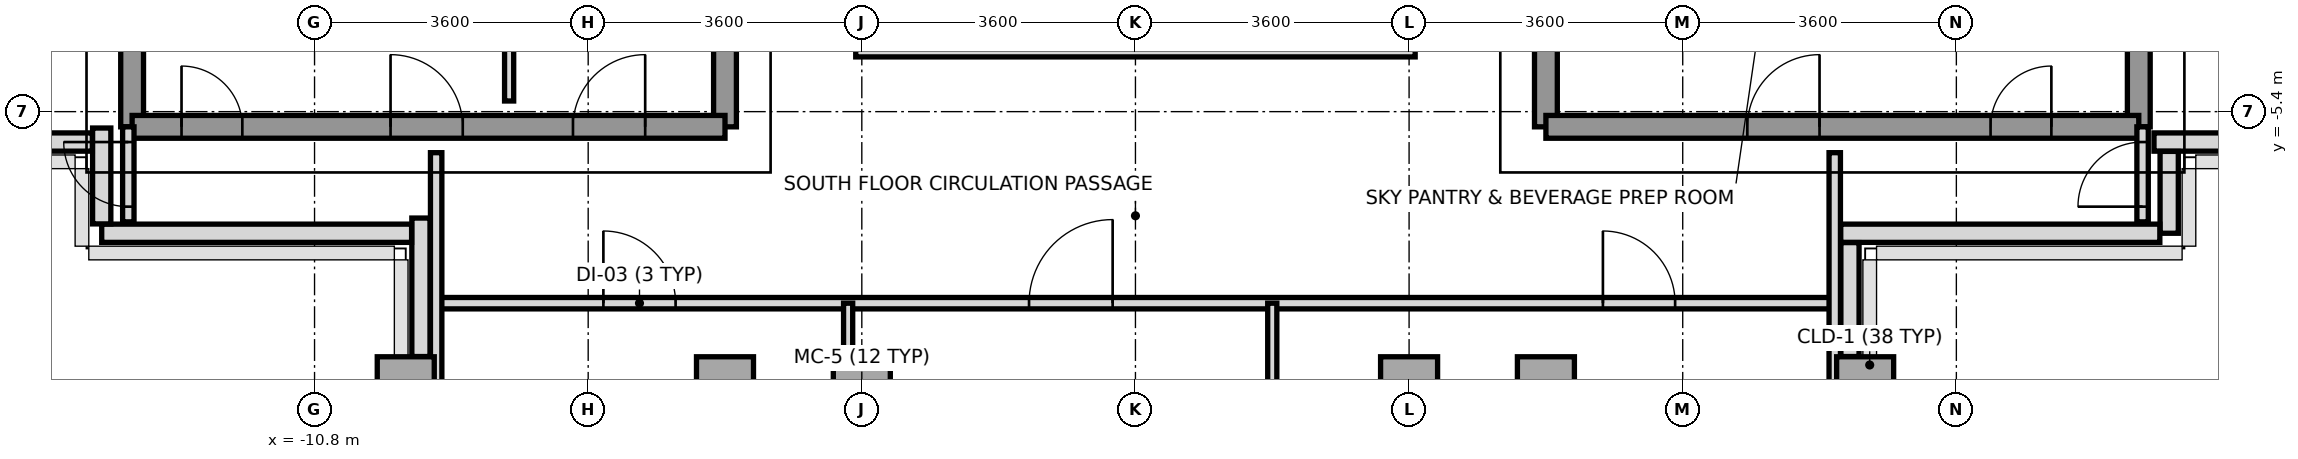
"""IFC4 building model, lengths in metres.
Left out: names, types, materials, properties, quantities, classifications, styles, units other than length and angle.
Written with IfcOpenShell. Run it as: python <this file> out.ifc"""

import sys

from ifc_helpers import new_model, si_unit, direction, frame, frame_2d, origin, origin_2d, place, context, subcontext, project, spatial, rectangle, extrude, source, transform, mapped, element, fill, save


model = new_model("IFC4")
c1 = context("Model", 3, precision=1e-05, world=origin(), true_north=direction((0.0, 1.0)))
c2 = subcontext(c1, "Body", "Model", "MODEL_VIEW")
j1 = project(units=[si_unit("LENGTHUNIT", "METRE"), si_unit("PLANEANGLEUNIT", "RADIAN")], contexts=[c1])
p1 = place(None, origin())
s1 = spatial("IfcSite", under=j1, at=p1, CompositionType="ELEMENT")
p2 = place(p1, origin())
s2 = spatial("IfcBuilding", under=s1, at=p2, CompositionType="ELEMENT")
p3 = place(p2, frame((0.0, 0.0, 252.4)))
s3 = spatial("IfcBuildingStorey", under=s2, at=p3, CompositionType="ELEMENT", Elevation=252.4)
m1 = source(origin(), c2, "Body", "SweptSolid", [
    extrude(rectangle(XDim=0.75, YDim=0.75, at=origin_2d()), origin(), (0.0, 0.0, 1.0), 3.01),
])
for number, where, z_axis, x_axis in (
    (1, (-9.6, -9.0, 0.0), (0.0, 0.0, 1.0), (1.0, 0.0, 0.0)),
    (2, (-5.4, -9.0, 0.0), (0.0, 0.0, 1.0), (1.0, 0.0, 0.0)),
    (3, (-3.6, -9.0, 0.0), (0.0, 0.0, 1.0), (1.0, 0.0, 0.0)),
    (4, (3.6, -9.0, 0.0), (0.0, 0.0, 1.0), (1.0, 0.0, 0.0)),
    (5, (5.4, -9.0, 0.0), (0.0, 0.0, 1.0), (1.0, 0.0, 0.0)),
    (6, (9.6, -9.0, 0.0), (0.0, 0.0, 1.0), (1.0, 0.0, 0.0)),
):
    element("IfcColumn", number, at=place(p3, frame(where, z_axis=z_axis, x_axis=x_axis)), inside=s3, PredefinedType="COLUMN", context=c2, shape_type="MappedRepresentation", body=[
        mapped(m1, transform((0.0, 0.0, 0.0), x_axis=(1.0, 0.0, 0.0), y_axis=(0.0, 1.0, 0.0), z_axis=(0.0, 0.0, 1.0), scale=1.0)),
    ])
p4 = place(p3, frame((14.677, -5.8, 0.0), z_axis=(0.0, 0.0, 1.0), x_axis=(-1.0, 0.0, 0.0)))
e7 = element("IfcWall", 7, at=p4, inside=s3, PredefinedType="PARAPET", context=c2, shape_type="SweptSolid", body=[
    extrude(rectangle(XDim=1.277, YDim=0.24, at=frame_2d((0.639, 0.0))), origin(), (0.0, 0.0, 1.0), 1.15),
])
p5 = place(p3, frame((13.6, -5.923, 0.0), z_axis=(0.0, 0.0, 1.0), x_axis=(0.0, -1.0, 0.0)))
e8 = element("IfcWall", 8, at=p5, inside=s3, PredefinedType="PARAPET", context=c2, shape_type="SweptSolid", body=[
    extrude(rectangle(XDim=1.077, YDim=0.24, at=frame_2d((0.539, 0.0))), origin(), (0.0, 0.0, 1.0), 1.15),
])
p6 = place(p3, frame((13.477, -7.0, 0.0), z_axis=(0.0, 0.0, 1.0), x_axis=(-1.0, 0.0, 0.0)))
e9 = element("IfcWall", 9, at=p6, inside=s3, PredefinedType="PARAPET", context=c2, shape_type="SweptSolid", body=[
    extrude(rectangle(XDim=4.199, YDim=0.24, at=frame_2d((2.1, 0.0))), origin(), (0.0, 0.0, 1.0), 1.15),
])
p7 = place(p3, frame((9.4, -7.123, 0.0), z_axis=(0.0, 0.0, 1.0), x_axis=(0.0, -1.0, 0.0)))
e10 = element("IfcWall", 10, at=p7, inside=s3, PredefinedType="PARAPET", context=c2, shape_type="SweptSolid", body=[
    extrude(rectangle(XDim=1.499, YDim=0.24, at=frame_2d((0.75, 0.0))), origin(), (0.0, 0.0, 1.0), 1.15),
])
p8 = place(p3, frame((-9.4, -8.622, 0.0), z_axis=(0.0, 0.0, 1.0), x_axis=(0.0, 1.0, 0.0)))
e11 = element("IfcWall", 11, at=p8, inside=s3, PredefinedType="PARAPET", context=c2, shape_type="SweptSolid", body=[
    extrude(rectangle(XDim=1.822, YDim=0.24, at=frame_2d((0.911, 0.0))), origin(), (0.0, 0.0, 1.0), 1.15),
])
p9 = place(p3, frame((-9.523, -7.0, 0.0), z_axis=(0.0, 0.0, 1.0), x_axis=(-1.0, 0.0, 0.0)))
e12 = element("IfcWall", 12, at=p9, inside=s3, PredefinedType="PARAPET", context=c2, shape_type="SweptSolid", body=[
    extrude(rectangle(XDim=4.077, YDim=0.24, at=frame_2d((2.039, 0.0))), origin(), (0.0, 0.0, 1.0), 1.15),
])
p10 = place(p3, frame((-13.6, -6.877, 0.0), z_axis=(0.0, 0.0, 1.0), x_axis=(0.0, 1.0, 0.0)))
e13 = element("IfcWall", 13, at=p10, inside=s3, PredefinedType="PARAPET", context=c2, shape_type="SweptSolid", body=[
    extrude(rectangle(XDim=1.261, YDim=0.24, at=frame_2d((0.631, 0.0))), origin(), (0.0, 0.0, 1.0), 1.15),
])
p11 = place(p3, frame((-13.723, -5.8, 0.0), z_axis=(0.0, 0.0, 1.0), x_axis=(-1.0, 0.0, 0.0)))
e14 = element("IfcWall", 14, at=p11, inside=s3, PredefinedType="PARAPET", context=c2, shape_type="SweptSolid", body=[
    extrude(rectangle(XDim=1.077, YDim=0.24, at=frame_2d((0.539, 0.0))), origin(), (0.0, 0.0, 1.0), 1.15),
])
p12 = place(p3, frame((-13.2, -5.6, 0.0), z_axis=(0.0, 0.0, 1.0), x_axis=(0.0, 1.0, 0.0)))
e15 = element("IfcWall", 15, at=p12, inside=s3, PredefinedType="SHEAR", context=c2, shape_type="SweptSolid", body=[
    extrude(rectangle(XDim=11.2, YDim=0.3, at=frame_2d((5.6, 0.0))), origin(), (0.0, 0.0, 1.0), 3.01),
])
p13 = place(p3, frame((-5.4, -5.6, 0.0), z_axis=(0.0, 0.0, 1.0), x_axis=(0.0, 1.0, 0.0)))
e16 = element("IfcWall", 16, at=p13, inside=s3, PredefinedType="SHEAR", context=c2, shape_type="SweptSolid", body=[
    extrude(rectangle(XDim=12.5, YDim=0.3, at=frame_2d((6.25, 0.0))), origin(), (0.0, 0.0, 1.0), 3.01),
])
p14 = place(p13, frame((4.55, 0.0, 0.0)))
e17 = element("IfcOpeningElement", 17, at=p14, cuts=e16, PredefinedType="OPENING", context=c2, shape_type="SweptSolid", body=[
    extrude(rectangle(XDim=1.2, YDim=2.2, at=frame_2d((0.6, 1.1))), frame((0.0, 0.16, 0.0), z_axis=(0.0, -1.0, 0.0), x_axis=(1.0, 0.0, 0.0)), (0.0, 0.0, 1.0), 0.32),
])
p15 = place(p13, frame((10.45, 0.0, 0.0)))
e18 = element("IfcOpeningElement", 18, at=p15, cuts=e16, PredefinedType="OPENING", context=c2, shape_type="SweptSolid", body=[
    extrude(rectangle(XDim=1.2, YDim=2.2, at=frame_2d((0.6, 1.1))), frame((0.0, 0.16, 0.0), z_axis=(0.0, -1.0, 0.0), x_axis=(1.0, 0.0, 0.0)), (0.0, 0.0, 1.0), 0.32),
])
p16 = place(p13, frame((6.86, 0.0, 0.0)))
e19 = element("IfcOpeningElement", 19, at=p16, cuts=e16, PredefinedType="OPENING", context=c2, shape_type="SweptSolid", body=[
    extrude(rectangle(XDim=0.8, YDim=2.1, at=frame_2d((0.4, 1.05))), frame((0.0, 0.16, 0.0), z_axis=(0.0, -1.0, 0.0), x_axis=(1.0, 0.0, 0.0)), (0.0, 0.0, 1.0), 0.32),
])
p17 = place(p13, frame((7.88, 0.0, 0.0)))
e20 = element("IfcOpeningElement", 20, at=p17, cuts=e16, PredefinedType="OPENING", context=c2, shape_type="SweptSolid", body=[
    extrude(rectangle(XDim=0.8, YDim=2.1, at=frame_2d((0.4, 1.05))), frame((0.0, 0.16, 0.0), z_axis=(0.0, -1.0, 0.0), x_axis=(1.0, 0.0, 0.0)), (0.0, 0.0, 1.0), 0.32),
])
p18 = place(p3, frame((-13.2, -5.6, 0.0), z_axis=(0.0, 0.0, 1.0), x_axis=(1.0, 0.0, 0.0)))
e21 = element("IfcWall", 21, at=p18, inside=s3, PredefinedType="SHEAR", context=c2, shape_type="SweptSolid", body=[
    extrude(rectangle(XDim=7.8, YDim=0.3, at=frame_2d((3.9, 0.0))), origin(), (0.0, 0.0, 1.0), 3.01),
])
p19 = place(p18, frame((0.65, 0.0, 0.0)))
e22 = element("IfcOpeningElement", 22, at=p19, cuts=e21, PredefinedType="OPENING", context=c2, shape_type="SweptSolid", body=[
    extrude(rectangle(XDim=0.8, YDim=2.1, at=frame_2d((0.4, 1.05))), frame((0.0, 0.16, 0.0), z_axis=(0.0, -1.0, 0.0), x_axis=(1.0, 0.0, 0.0)), (0.0, 0.0, 1.0), 0.32),
])
p20 = place(p18, frame((3.4, 0.0, 0.0)))
e23 = element("IfcOpeningElement", 23, at=p20, cuts=e21, PredefinedType="OPENING", context=c2, shape_type="SweptSolid", body=[
    extrude(rectangle(XDim=0.95, YDim=2.15, at=frame_2d((0.475, 1.075))), frame((0.0, 0.16, 0.0), z_axis=(0.0, -1.0, 0.0), x_axis=(1.0, 0.0, 0.0)), (0.0, 0.0, 1.0), 0.32),
])
p21 = place(p18, frame((5.8, 0.0, 0.0)))
e24 = element("IfcOpeningElement", 24, at=p21, cuts=e21, PredefinedType="OPENING", context=c2, shape_type="SweptSolid", body=[
    extrude(rectangle(XDim=0.95, YDim=2.15, at=frame_2d((0.475, 1.075))), frame((0.0, 0.16, 0.0), z_axis=(0.0, -1.0, 0.0), x_axis=(1.0, 0.0, 0.0)), (0.0, 0.0, 1.0), 0.32),
])
p22 = place(p3, frame((13.2, -5.6, 0.0), z_axis=(0.0, 0.0, 1.0), x_axis=(0.0, 1.0, 0.0)))
e25 = element("IfcWall", 25, at=p22, inside=s3, PredefinedType="SHEAR", context=c2, shape_type="SweptSolid", body=[
    extrude(rectangle(XDim=11.2, YDim=0.3, at=frame_2d((5.6, 0.0))), origin(), (0.0, 0.0, 1.0), 3.01),
])
p23 = place(p3, frame((5.4, -5.6, 0.0), z_axis=(0.0, 0.0, 1.0), x_axis=(0.0, 1.0, 0.0)))
e26 = element("IfcWall", 26, at=p23, inside=s3, PredefinedType="SHEAR", context=c2, shape_type="SweptSolid", body=[
    extrude(rectangle(XDim=12.5, YDim=0.3, at=frame_2d((6.25, 0.0))), origin(), (0.0, 0.0, 1.0), 3.01),
])
p24 = place(p23, frame((4.55, 0.0, 0.0)))
e27 = element("IfcOpeningElement", 27, at=p24, cuts=e26, PredefinedType="OPENING", context=c2, shape_type="SweptSolid", body=[
    extrude(rectangle(XDim=1.2, YDim=2.2, at=frame_2d((0.6, 1.1))), frame((0.0, 0.16, 0.0), z_axis=(0.0, -1.0, 0.0), x_axis=(1.0, 0.0, 0.0)), (0.0, 0.0, 1.0), 0.32),
])
p25 = place(p23, frame((10.45, 0.0, 0.0)))
e28 = element("IfcOpeningElement", 28, at=p25, cuts=e26, PredefinedType="OPENING", context=c2, shape_type="SweptSolid", body=[
    extrude(rectangle(XDim=1.2, YDim=2.2, at=frame_2d((0.6, 1.1))), frame((0.0, 0.16, 0.0), z_axis=(0.0, -1.0, 0.0), x_axis=(1.0, 0.0, 0.0)), (0.0, 0.0, 1.0), 0.32),
])
p26 = place(p3, frame((5.4, -5.6, 0.0), z_axis=(0.0, 0.0, 1.0), x_axis=(1.0, 0.0, 0.0)))
e29 = element("IfcWall", 29, at=p26, inside=s3, PredefinedType="SHEAR", context=c2, shape_type="SweptSolid", body=[
    extrude(rectangle(XDim=7.8, YDim=0.3, at=frame_2d((3.9, 0.0))), origin(), (0.0, 0.0, 1.0), 3.01),
])
p27 = place(p26, frame((5.85, 0.0, 0.0)))
e30 = element("IfcOpeningElement", 30, at=p27, cuts=e29, PredefinedType="OPENING", context=c2, shape_type="SweptSolid", body=[
    extrude(rectangle(XDim=0.8, YDim=2.1, at=frame_2d((0.4, 1.05))), frame((0.0, 0.16, 0.0), z_axis=(0.0, -1.0, 0.0), x_axis=(1.0, 0.0, 0.0)), (0.0, 0.0, 1.0), 0.32),
])
p28 = place(p26, frame((2.65, 0.0, 0.0)))
e31 = element("IfcOpeningElement", 31, at=p28, cuts=e29, PredefinedType="OPENING", context=c2, shape_type="SweptSolid", body=[
    extrude(rectangle(XDim=0.95, YDim=2.15, at=frame_2d((0.475, 1.075))), frame((0.0, 0.16, 0.0), z_axis=(0.0, -1.0, 0.0), x_axis=(1.0, 0.0, 0.0)), (0.0, 0.0, 1.0), 0.32),
])
p29 = place(p3, frame((-8.24, -5.26, 0.0), z_axis=(0.0, 0.0, 1.0), x_axis=(0.0, 1.0, 0.0)))
e32 = element("IfcWall", 32, at=p29, inside=s3, PredefinedType="PARTITIONING", context=c2, shape_type="SweptSolid", body=[
    extrude(rectangle(XDim=2.94, YDim=0.12, at=frame_2d((1.47, 0.0))), origin(), (0.0, 0.0, 1.0), 3.01),
])
p30 = place(p3, frame((-9.2, -7.92, 0.0), z_axis=(0.0, 0.0, 1.0), x_axis=(1.0, 0.0, 0.0)))
e33 = element("IfcWall", 33, at=p30, inside=s3, PredefinedType="PARTITIONING", context=c2, shape_type="SweptSolid", body=[
    extrude(rectangle(XDim=18.4, YDim=0.15, at=frame_2d((9.2, 0.0))), origin(), (0.0, 0.0, 1.0), 2.57),
])
p31 = place(p30, frame((2.2, 0.0, 0.0)))
e34 = element("IfcOpeningElement", 34, at=p31, cuts=e33, PredefinedType="OPENING", context=c2, shape_type="SweptSolid", body=[
    extrude(rectangle(XDim=0.95, YDim=2.15, at=frame_2d((0.475, 1.075))), frame((0.0, 0.085, 0.0), z_axis=(0.0, -1.0, 0.0), x_axis=(1.0, 0.0, 0.0)), (0.0, 0.0, 1.0), 0.17),
])
p32 = place(p30, frame((7.8, 0.0, 0.0)))
e35 = element("IfcOpeningElement", 35, at=p32, cuts=e33, PredefinedType="OPENING", context=c2, shape_type="SweptSolid", body=[
    extrude(rectangle(XDim=1.1, YDim=2.2, at=frame_2d((0.55, 1.1))), frame((0.0, 0.085, 0.0), z_axis=(0.0, -1.0, 0.0), x_axis=(1.0, 0.0, 0.0)), (0.0, 0.0, 1.0), 0.17),
])
p33 = place(p30, frame((15.35, 0.0, 0.0)))
e36 = element("IfcOpeningElement", 36, at=p33, cuts=e33, PredefinedType="OPENING", context=c2, shape_type="SweptSolid", body=[
    extrude(rectangle(XDim=0.95, YDim=2.15, at=frame_2d((0.475, 1.075))), frame((0.0, 0.085, 0.0), z_axis=(0.0, -1.0, 0.0), x_axis=(1.0, 0.0, 0.0)), (0.0, 0.0, 1.0), 0.17),
])
for number, where, z_axis, x_axis in (
    (37, (-9.2, -10.28, 0.0), (0.0, 0.0, 1.0), (0.0, 1.0, 0.0)),
    (38, (9.2, -10.28, 0.0), (0.0, 0.0, 1.0), (0.0, 1.0, 0.0)),
):
    element("IfcWall", number, at=place(p3, frame(where, z_axis=z_axis, x_axis=x_axis)), inside=s3, PredefinedType="PARTITIONING", context=c2, shape_type="SweptSolid", body=[
        extrude(rectangle(XDim=4.34, YDim=0.15, at=frame_2d((2.17, 0.0))), origin(), (0.0, 0.0, 1.0), 2.61),
    ])
p34 = place(p3, frame((-3.78, -19.25, 0.0), z_axis=(0.0, 0.0, 1.0), x_axis=(0.0, 1.0, 0.0)))
e39 = element("IfcWall", 39, at=p34, inside=s3, PredefinedType="PARTITIONING", context=c2, shape_type="SweptSolid", body=[
    extrude(rectangle(XDim=11.33, YDim=0.12, at=frame_2d((5.665, 0.0))), origin(), (0.0, 0.0, 1.0), 2.57),
])
p35 = place(p3, frame((1.8, -19.25, 0.0), z_axis=(0.0, 0.0, 1.0), x_axis=(0.0, 1.0, 0.0)))
e40 = element("IfcWall", 40, at=p35, inside=s3, PredefinedType="PARTITIONING", context=c2, shape_type="SweptSolid", body=[
    extrude(rectangle(XDim=11.33, YDim=0.12, at=frame_2d((5.665, 0.0))), origin(), (0.0, 0.0, 1.0), 2.61),
])
p36 = place(p3, frame((-13.25, -6.85, 0.0), z_axis=(0.0, 0.0, 1.0), x_axis=(0.0, 1.0, 0.0)))
e41 = element("IfcWall", 41, at=p36, inside=s3, PredefinedType="PARTITIONING", context=c2, shape_type="SweptSolid", body=[
    extrude(rectangle(XDim=1.25, YDim=0.15, at=frame_2d((0.625, 0.0))), origin(), (0.0, 0.0, 1.0), 3.01),
])
p37 = place(p36, frame((0.2, 0.0, 0.0)))
e42 = element("IfcOpeningElement", 42, at=p37, cuts=e41, PredefinedType="OPENING", context=c2, shape_type="SweptSolid", body=[
    extrude(rectangle(XDim=0.85, YDim=2.1, at=frame_2d((0.425, 1.05))), frame((0.0, 0.085, 0.0), z_axis=(0.0, -1.0, 0.0), x_axis=(1.0, 0.0, 0.0)), (0.0, 0.0, 1.0), 0.17),
])
p38 = place(p3, frame((13.25, -6.85, 0.0), z_axis=(0.0, 0.0, 1.0), x_axis=(0.0, 1.0, 0.0)))
e43 = element("IfcWall", 43, at=p38, inside=s3, PredefinedType="PARTITIONING", context=c2, shape_type="SweptSolid", body=[
    extrude(rectangle(XDim=1.25, YDim=0.15, at=frame_2d((0.625, 0.0))), origin(), (0.0, 0.0, 1.0), 3.01),
])
p39 = place(p38, frame((0.2, 0.0, 0.0)))
e44 = element("IfcOpeningElement", 44, at=p39, cuts=e43, PredefinedType="OPENING", context=c2, shape_type="SweptSolid", body=[
    extrude(rectangle(XDim=0.85, YDim=2.1, at=frame_2d((0.425, 1.05))), frame((0.0, 0.085, 0.0), z_axis=(0.0, -1.0, 0.0), x_axis=(1.0, 0.0, 0.0)), (0.0, 0.0, 1.0), 0.17),
])
p40 = place(p3, frame((-3.68, -4.56, 0.0), z_axis=(0.0, 0.0, 1.0), x_axis=(1.0, 0.0, 0.0)))
e45 = element("IfcWall", 45, at=p40, inside=s3, PredefinedType="PARAPET", context=c2, shape_type="SweptSolid", body=[
    extrude(rectangle(XDim=7.36, YDim=0.24, at=frame_2d((3.68, 0.0))), origin(), (0.0, 0.0, 1.0), 1.15),
])
m2 = source(origin(), c2, "Body", "SweptSolid", [
    extrude(rectangle(XDim=0.8, YDim=2.1, at=frame_2d((0.4, 1.05))), frame((0.0, 0.025, 0.0), z_axis=(0.0, -1.0, 0.0), x_axis=(1.0, 0.0, 0.0)), (0.0, 0.0, 1.0), 0.05),
])
p41 = place(p19, origin())
e46 = element("IfcDoor", 46, at=p41, inside=s3, OperationType="SINGLE_SWING_LEFT", PredefinedType="DOOR", context=c2, shape_type="MappedRepresentation", body=[
    mapped(m2, transform((0.0, 0.0, 0.0), x_axis=(1.0, 0.0, 0.0), y_axis=(0.0, 1.0, 0.0), z_axis=(0.0, 0.0, 1.0), scale=1.0)),
])
fill(e22, e46)
p42 = place(p27, origin())
e47 = element("IfcDoor", 47, at=p42, inside=s3, OperationType="SINGLE_SWING_RIGHT", PredefinedType="DOOR", context=c2, shape_type="MappedRepresentation", body=[
    mapped(m2, transform((0.0, 0.0, 0.0), x_axis=(1.0, 0.0, 0.0), y_axis=(0.0, 1.0, 0.0), z_axis=(0.0, 0.0, 1.0), scale=1.0)),
])
fill(e30, e47)
m3 = source(origin(), c2, "Body", "SweptSolid", [
    extrude(rectangle(XDim=0.95, YDim=2.15, at=frame_2d((0.475, 1.075))), frame((0.0, 0.025, 0.0), z_axis=(0.0, -1.0, 0.0), x_axis=(1.0, 0.0, 0.0)), (0.0, 0.0, 1.0), 0.05),
])
p43 = place(p20, origin())
e48 = element("IfcDoor", 48, at=p43, inside=s3, OperationType="SINGLE_SWING_LEFT", PredefinedType="DOOR", context=c2, shape_type="MappedRepresentation", body=[
    mapped(m3, transform((0.0, 0.0, 0.0), x_axis=(1.0, 0.0, 0.0), y_axis=(0.0, 1.0, 0.0), z_axis=(0.0, 0.0, 1.0), scale=1.0)),
])
fill(e23, e48)
p44 = place(p21, origin())
e49 = element("IfcDoor", 49, at=p44, inside=s3, OperationType="SINGLE_SWING_RIGHT", PredefinedType="DOOR", context=c2, shape_type="MappedRepresentation", body=[
    mapped(m3, transform((0.0, 0.0, 0.0), x_axis=(1.0, 0.0, 0.0), y_axis=(0.0, 1.0, 0.0), z_axis=(0.0, 0.0, 1.0), scale=1.0)),
])
fill(e24, e49)
p45 = place(p28, origin())
e50 = element("IfcDoor", 50, at=p45, inside=s3, OperationType="SINGLE_SWING_RIGHT", PredefinedType="DOOR", context=c2, shape_type="MappedRepresentation", body=[
    mapped(m3, transform((0.0, 0.0, 0.0), x_axis=(1.0, 0.0, 0.0), y_axis=(0.0, 1.0, 0.0), z_axis=(0.0, 0.0, 1.0), scale=1.0)),
])
fill(e31, e50)
p46 = place(p31, origin())
e51 = element("IfcDoor", 51, at=p46, inside=s3, OperationType="SINGLE_SWING_LEFT", PredefinedType="DOOR", context=c2, shape_type="MappedRepresentation", body=[
    mapped(m3, transform((0.0, 0.0, 0.0), x_axis=(1.0, 0.0, 0.0), y_axis=(0.0, 1.0, 0.0), z_axis=(0.0, 0.0, 1.0), scale=1.0)),
])
fill(e34, e51)
m4 = source(origin(), c2, "Body", "SweptSolid", [
    extrude(rectangle(XDim=1.1, YDim=2.2, at=frame_2d((0.55, 1.1))), frame((0.0, 0.025, 0.0), z_axis=(0.0, -1.0, 0.0), x_axis=(1.0, 0.0, 0.0)), (0.0, 0.0, 1.0), 0.05),
])
p47 = place(p32, origin())
e52 = element("IfcDoor", 52, at=p47, inside=s3, OperationType="SINGLE_SWING_RIGHT", PredefinedType="DOOR", context=c2, shape_type="MappedRepresentation", body=[
    mapped(m4, transform((0.0, 0.0, 0.0), x_axis=(1.0, 0.0, 0.0), y_axis=(0.0, 1.0, 0.0), z_axis=(0.0, 0.0, 1.0), scale=1.0)),
])
fill(e35, e52)
p48 = place(p33, origin())
e53 = element("IfcDoor", 53, at=p48, inside=s3, OperationType="SINGLE_SWING_LEFT", PredefinedType="DOOR", context=c2, shape_type="MappedRepresentation", body=[
    mapped(m3, transform((0.0, 0.0, 0.0), x_axis=(1.0, 0.0, 0.0), y_axis=(0.0, 1.0, 0.0), z_axis=(0.0, 0.0, 1.0), scale=1.0)),
])
fill(e36, e53)
m5 = source(origin(), c2, "Body", "SweptSolid", [
    extrude(rectangle(XDim=0.85, YDim=2.1, at=frame_2d((0.425, 1.05))), frame((0.0, 0.025, 0.0), z_axis=(0.0, -1.0, 0.0), x_axis=(1.0, 0.0, 0.0)), (0.0, 0.0, 1.0), 0.05),
])
p49 = place(p37, origin())
e54 = element("IfcDoor", 54, at=p49, inside=s3, OperationType="SINGLE_SWING_RIGHT", PredefinedType="DOOR", context=c2, shape_type="MappedRepresentation", body=[
    mapped(m5, transform((0.0, 0.0, 0.0), x_axis=(1.0, 0.0, 0.0), y_axis=(0.0, 1.0, 0.0), z_axis=(0.0, 0.0, 1.0), scale=1.0)),
])
fill(e42, e54)
p50 = place(p39, origin())
e55 = element("IfcDoor", 55, at=p50, inside=s3, OperationType="SINGLE_SWING_LEFT", PredefinedType="DOOR", context=c2, shape_type="MappedRepresentation", body=[
    mapped(m5, transform((0.0, 0.0, 0.0), x_axis=(1.0, 0.0, 0.0), y_axis=(0.0, 1.0, 0.0), z_axis=(0.0, 0.0, 1.0), scale=1.0)),
])
fill(e44, e55)
save(model, sys.argv[1])
